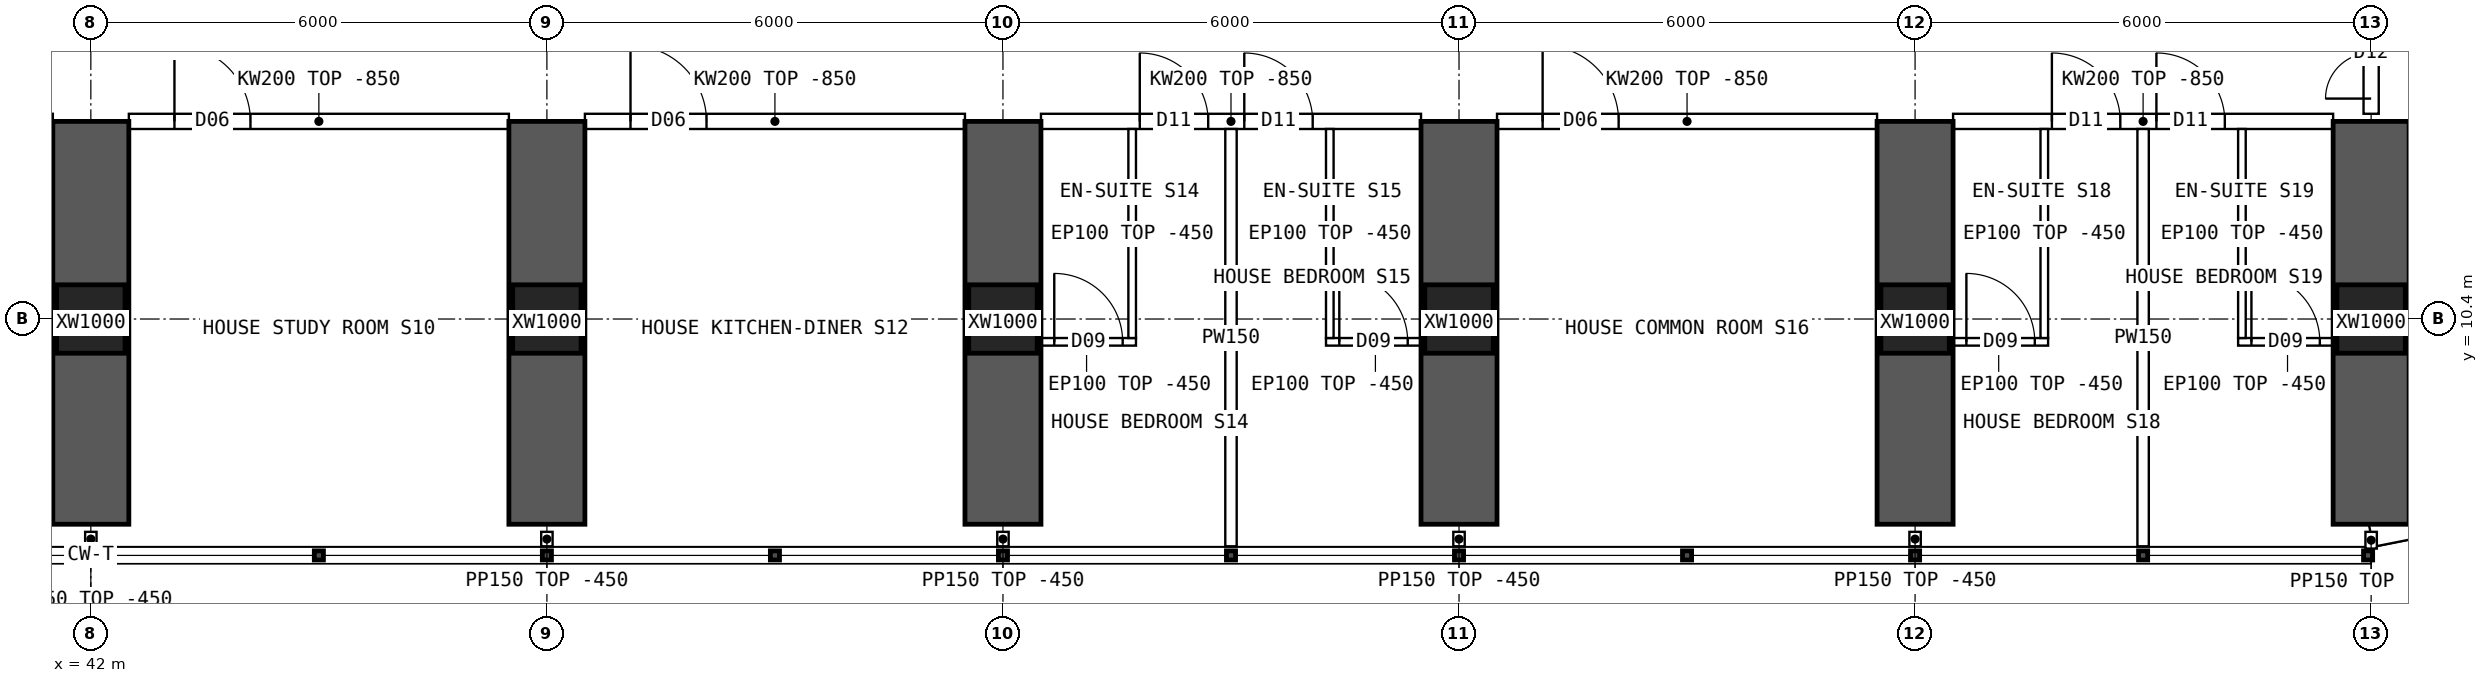
"""IFC4 building model, lengths in metres.
Left out: names, types, materials, properties, quantities, classifications, styles, units other than length and angle.
Written with IfcOpenShell. Run it as: python <this file> out.ifc"""

import sys

from ifc_helpers import new_model, si_unit, direction, frame, frame_2d, origin, origin_2d, place, context, subcontext, project, spatial, polyline, rectangle, hollow_rectangle, outline, extrude, element, fill, save


model = new_model("IFC4")
c1 = context("Model", 3, precision=1e-05, world=origin(), true_north=direction((0.0, 1.0)))
c2 = subcontext(c1, "Body", "Model", "MODEL_VIEW")
j1 = project(units=[si_unit("LENGTHUNIT", "METRE"), si_unit("PLANEANGLEUNIT", "RADIAN")], contexts=[c1])
p1 = place(None, origin())
s1 = spatial("IfcSite", under=j1, at=p1, CompositionType="ELEMENT")
p2 = place(p1, origin())
s2 = spatial("IfcBuilding", under=s1, at=p2, CompositionType="ELEMENT")
p3 = place(p2, frame((0.0, 0.0, 50.2)))
s3 = spatial("IfcBuildingStorey", under=s2, at=p3, CompositionType="ELEMENT", Elevation=50.2)
for number, where, z_axis, x_axis in (
    (1, (42.0, 10.4, 0.0), (0.0, 0.0, 1.0), (1.0, 0.0, 0.0)),
    (2, (48.0, 10.4, 0.0), (0.0, 0.0, 1.0), (1.0, 0.0, 0.0)),
    (3, (54.0, 10.4, 0.0), (0.0, 0.0, 1.0), (1.0, 0.0, 0.0)),
    (4, (60.0, 10.4, 0.0), (0.0, 0.0, 1.0), (1.0, 0.0, 0.0)),
    (5, (66.0, 10.4, 0.0), (0.0, 0.0, 1.0), (1.0, 0.0, 0.0)),
    (6, (72.0, 10.4, 0.0), (0.0, 0.0, 1.0), (1.0, 0.0, 0.0)),
):
    element("IfcColumn", number, at=place(p3, frame(where, z_axis=z_axis, x_axis=x_axis)), inside=s3, PredefinedType="COLUMN", context=c2, shape_type="SweptSolid", body=[
        extrude(hollow_rectangle(XDim=0.9, YDim=0.9, WallThickness=0.09, at=origin_2d()), origin(), (0.0, 0.0, 1.0), 3.75),
    ])
for number, where, z_axis, x_axis in (
    (7, (42.0, 7.7, 0.0), (0.0, 0.0, 1.0), (0.0, 1.0, 0.0)),
    (8, (48.0, 7.7, 0.0), (0.0, 0.0, 1.0), (0.0, 1.0, 0.0)),
    (9, (54.0, 7.7, 0.0), (0.0, 0.0, 1.0), (0.0, 1.0, 0.0)),
    (10, (60.0, 7.7, 0.0), (0.0, 0.0, 1.0), (0.0, 1.0, 0.0)),
    (11, (66.0, 7.7, 0.0), (0.0, 0.0, 1.0), (0.0, 1.0, 0.0)),
    (12, (72.0, 7.7, 0.0), (0.0, 0.0, 1.0), (0.0, 1.0, 0.0)),
):
    element("IfcWall", number, at=place(p3, frame(where, z_axis=z_axis, x_axis=x_axis)), inside=s3, PredefinedType="SHEAR", context=c2, shape_type="SweptSolid", body=[
        extrude(rectangle(XDim=5.3, YDim=1.0, at=frame_2d((2.65, 0.0))), origin(), (0.0, 0.0, 1.0), 3.75),
    ])
p4 = place(p3, frame((72.0, 7.55, 0.0), z_axis=(0.0, 0.0, 1.0), x_axis=(0.980787251524, 0.195080412259, 0.0)))
e13 = element("IfcWall", 13, at=p4, inside=s3, PredefinedType="SOLIDWALL", context=c2, shape_type="SweptSolid", body=[
    extrude(outline(polyline([(-0.03, -0.15), (3.249, -0.15), (3.189, 0.15), (0.03, 0.15), (-0.03, -0.15)])), origin(), (0.0, 0.0, 1.0), 3.3),
])
p5 = place(p4, frame((0.909, 0.0, 0.9)))
e14 = element("IfcOpeningElement", 14, at=p5, cuts=e13, PredefinedType="OPENING", context=c2, shape_type="SweptSolid", body=[
    extrude(rectangle(XDim=1.4, YDim=1.8, at=frame_2d((0.7, 0.9))), frame((0.0, 0.16, 0.0), z_axis=(0.0, -1.0, 0.0), x_axis=(1.0, 0.0, 0.0)), (0.0, 0.0, 1.0), 0.32),
])
p6 = place(p3, frame((42.5, 13.0, 0.0), z_axis=(0.0, 0.0, 1.0), x_axis=(1.0, 0.0, 0.0)))
e15 = element("IfcWall", 15, at=p6, inside=s3, PredefinedType="SOLIDWALL", context=c2, shape_type="SweptSolid", body=[
    extrude(outline(polyline([(0.0, 0.0), (5.0, 0.0), (5.0, 2.9), (0.0, 2.9), (0.0, 0.0)])), frame((0.0, 0.1, 0.0), z_axis=(0.0, -1.0, 0.0), x_axis=(1.0, 0.0, 0.0)), (0.0, 0.0, 1.0), 0.2),
])
p7 = place(p6, frame((0.6, 0.0, 0.0)))
e16 = element("IfcOpeningElement", 16, at=p7, cuts=e15, PredefinedType="OPENING", context=c2, shape_type="SweptSolid", body=[
    extrude(rectangle(XDim=1.0, YDim=2.1, at=frame_2d((0.5, 1.05))), frame((0.0, 0.11, 0.0), z_axis=(0.0, -1.0, 0.0), x_axis=(1.0, 0.0, 0.0)), (0.0, 0.0, 1.0), 0.22),
])
p8 = place(p3, frame((48.5, 13.0, 0.0), z_axis=(0.0, 0.0, 1.0), x_axis=(1.0, 0.0, 0.0)))
e17 = element("IfcWall", 17, at=p8, inside=s3, PredefinedType="SOLIDWALL", context=c2, shape_type="SweptSolid", body=[
    extrude(outline(polyline([(0.0, 0.0), (5.0, 0.0), (5.0, 2.9), (0.0, 2.9), (0.0, 0.0)])), frame((0.0, 0.1, 0.0), z_axis=(0.0, -1.0, 0.0), x_axis=(1.0, 0.0, 0.0)), (0.0, 0.0, 1.0), 0.2),
])
p9 = place(p8, frame((0.6, 0.0, 0.0)))
e18 = element("IfcOpeningElement", 18, at=p9, cuts=e17, PredefinedType="OPENING", context=c2, shape_type="SweptSolid", body=[
    extrude(rectangle(XDim=1.0, YDim=2.1, at=frame_2d((0.5, 1.05))), frame((0.0, 0.11, 0.0), z_axis=(0.0, -1.0, 0.0), x_axis=(1.0, 0.0, 0.0)), (0.0, 0.0, 1.0), 0.22),
])
p10 = place(p3, frame((54.5, 13.0, 0.0), z_axis=(0.0, 0.0, 1.0), x_axis=(1.0, 0.0, 0.0)))
e19 = element("IfcWall", 19, at=p10, inside=s3, PredefinedType="SOLIDWALL", context=c2, shape_type="SweptSolid", body=[
    extrude(outline(polyline([(0.0, 0.0), (5.0, 0.0), (5.0, 2.9), (0.0, 2.9), (0.0, 0.0)])), frame((0.0, 0.1, 0.0), z_axis=(0.0, -1.0, 0.0), x_axis=(1.0, 0.0, 0.0)), (0.0, 0.0, 1.0), 0.2),
])
p11 = place(p10, frame((1.3, 0.0, 0.0)))
e20 = element("IfcOpeningElement", 20, at=p11, cuts=e19, PredefinedType="OPENING", context=c2, shape_type="SweptSolid", body=[
    extrude(rectangle(XDim=0.9, YDim=2.1, at=frame_2d((0.45, 1.05))), frame((0.0, 0.11, 0.0), z_axis=(0.0, -1.0, 0.0), x_axis=(1.0, 0.0, 0.0)), (0.0, 0.0, 1.0), 0.22),
])
p12 = place(p10, frame((2.675, 0.0, 0.0)))
e21 = element("IfcOpeningElement", 21, at=p12, cuts=e19, PredefinedType="OPENING", context=c2, shape_type="SweptSolid", body=[
    extrude(rectangle(XDim=0.9, YDim=2.1, at=frame_2d((0.45, 1.05))), frame((0.0, 0.11, 0.0), z_axis=(0.0, -1.0, 0.0), x_axis=(1.0, 0.0, 0.0)), (0.0, 0.0, 1.0), 0.22),
])
p13 = place(p3, frame((60.5, 13.0, 0.0), z_axis=(0.0, 0.0, 1.0), x_axis=(1.0, 0.0, 0.0)))
e22 = element("IfcWall", 22, at=p13, inside=s3, PredefinedType="SOLIDWALL", context=c2, shape_type="SweptSolid", body=[
    extrude(outline(polyline([(0.0, 0.0), (5.0, 0.0), (5.0, 2.9), (0.0, 2.9), (0.0, 0.0)])), frame((0.0, 0.1, 0.0), z_axis=(0.0, -1.0, 0.0), x_axis=(1.0, 0.0, 0.0)), (0.0, 0.0, 1.0), 0.2),
])
p14 = place(p13, frame((0.6, 0.0, 0.0)))
e23 = element("IfcOpeningElement", 23, at=p14, cuts=e22, PredefinedType="OPENING", context=c2, shape_type="SweptSolid", body=[
    extrude(rectangle(XDim=1.0, YDim=2.1, at=frame_2d((0.5, 1.05))), frame((0.0, 0.11, 0.0), z_axis=(0.0, -1.0, 0.0), x_axis=(1.0, 0.0, 0.0)), (0.0, 0.0, 1.0), 0.22),
])
p15 = place(p3, frame((66.5, 13.0, 0.0), z_axis=(0.0, 0.0, 1.0), x_axis=(1.0, 0.0, 0.0)))
e24 = element("IfcWall", 24, at=p15, inside=s3, PredefinedType="SOLIDWALL", context=c2, shape_type="SweptSolid", body=[
    extrude(outline(polyline([(0.0, 0.0), (5.0, 0.0), (5.0, 2.9), (0.0, 2.9), (0.0, 0.0)])), frame((0.0, 0.1, 0.0), z_axis=(0.0, -1.0, 0.0), x_axis=(1.0, 0.0, 0.0)), (0.0, 0.0, 1.0), 0.2),
])
p16 = place(p15, frame((1.3, 0.0, 0.0)))
e25 = element("IfcOpeningElement", 25, at=p16, cuts=e24, PredefinedType="OPENING", context=c2, shape_type="SweptSolid", body=[
    extrude(rectangle(XDim=0.9, YDim=2.1, at=frame_2d((0.45, 1.05))), frame((0.0, 0.11, 0.0), z_axis=(0.0, -1.0, 0.0), x_axis=(1.0, 0.0, 0.0)), (0.0, 0.0, 1.0), 0.22),
])
p17 = place(p15, frame((2.675, 0.0, 0.0)))
e26 = element("IfcOpeningElement", 26, at=p17, cuts=e24, PredefinedType="OPENING", context=c2, shape_type="SweptSolid", body=[
    extrude(rectangle(XDim=0.9, YDim=2.1, at=frame_2d((0.45, 1.05))), frame((0.0, 0.11, 0.0), z_axis=(0.0, -1.0, 0.0), x_axis=(1.0, 0.0, 0.0)), (0.0, 0.0, 1.0), 0.22),
])
p18 = place(p3, frame((38.85, 10.3, 0.0), z_axis=(0.0, 0.0, 1.0), x_axis=(1.0, 0.0, 0.0)))
e27 = element("IfcWall", 27, at=p18, inside=s3, PredefinedType="PARTITIONING", context=c2, shape_type="SweptSolid", body=[
    extrude(outline(polyline([(0.0, 0.0), (2.7, 0.0), (2.7, 2.9), (0.0, 2.9), (0.0, 0.0)])), frame((0.0, 0.05, 0.0), z_axis=(0.0, -1.0, 0.0), x_axis=(1.0, 0.0, 0.0)), (0.0, 0.0, 1.0), 0.1),
])
p19 = place(p3, frame((57.0, 7.41, 0.0), z_axis=(0.0, 0.0, 1.0), x_axis=(0.0, 1.0, 0.0)))
e28 = element("IfcWall", 28, at=p19, inside=s3, PredefinedType="PARTITIONING", context=c2, shape_type="SweptSolid", body=[
    extrude(outline(polyline([(0.0, 0.0), (5.49, 0.0), (5.49, 2.9), (5.442, 2.9), (5.44, 3.3), (3.192, 3.3), (3.19, 2.9), (2.792, 2.9), (2.79, 3.3), (0.0, 3.3), (0.0, 0.0)])), frame((0.0, 0.075, 0.0), z_axis=(0.0, -1.0, 0.0), x_axis=(1.0, 0.0, 0.0)), (0.0, 0.0, 1.0), 0.15),
])
p20 = place(p3, frame((55.75, 10.1, 0.0), z_axis=(0.0, 0.0, 1.0), x_axis=(-1.0, 0.0, 0.0)))
e29 = element("IfcWall", 29, at=p20, inside=s3, PredefinedType="PARTITIONING", context=c2, shape_type="SweptSolid", body=[
    extrude(rectangle(XDim=1.3, YDim=0.1, at=frame_2d((0.65, 0.0))), origin(), (0.0, 0.0, 1.0), 3.3),
])
p21 = place(p20, frame((0.175, 0.0, 0.0)))
e30 = element("IfcOpeningElement", 30, at=p21, cuts=e29, PredefinedType="OPENING", context=c2, shape_type="SweptSolid", body=[
    extrude(rectangle(XDim=0.9, YDim=2.1, at=frame_2d((0.45, 1.05))), frame((0.0, 0.06, 0.0), z_axis=(0.0, -1.0, 0.0), x_axis=(1.0, 0.0, 0.0)), (0.0, 0.0, 1.0), 0.12),
])
p22 = place(p3, frame((55.7, 10.15, 0.0), z_axis=(0.0, 0.0, 1.0), x_axis=(0.0, 1.0, 0.0)))
e31 = element("IfcWall", 31, at=p22, inside=s3, PredefinedType="PARTITIONING", context=c2, shape_type="SweptSolid", body=[
    extrude(outline(polyline([(0.0, 0.0), (2.75, 0.0), (2.75, 2.9), (2.702, 2.9), (2.7, 3.3), (0.452, 3.3), (0.45, 2.9), (0.052, 2.9), (0.05, 3.3), (0.0, 3.3), (0.0, 0.0)])), frame((0.0, 0.05, 0.0), z_axis=(0.0, -1.0, 0.0), x_axis=(1.0, 0.0, 0.0)), (0.0, 0.0, 1.0), 0.1),
])
p23 = place(p3, frame((59.55, 10.1, 0.0), z_axis=(0.0, 0.0, 1.0), x_axis=(-1.0, 0.0, 0.0)))
e32 = element("IfcWall", 32, at=p23, inside=s3, PredefinedType="PARTITIONING", context=c2, shape_type="SweptSolid", body=[
    extrude(rectangle(XDim=1.3, YDim=0.1, at=frame_2d((0.65, 0.0))), origin(), (0.0, 0.0, 1.0), 3.3),
])
p24 = place(p23, frame((0.225, 0.0, 0.0)))
e33 = element("IfcOpeningElement", 33, at=p24, cuts=e32, PredefinedType="OPENING", context=c2, shape_type="SweptSolid", body=[
    extrude(rectangle(XDim=0.9, YDim=2.1, at=frame_2d((0.45, 1.05))), frame((0.0, 0.06, 0.0), z_axis=(0.0, -1.0, 0.0), x_axis=(1.0, 0.0, 0.0)), (0.0, 0.0, 1.0), 0.12),
])
p25 = place(p3, frame((58.3, 10.15, 0.0), z_axis=(0.0, 0.0, 1.0), x_axis=(0.0, 1.0, 0.0)))
e34 = element("IfcWall", 34, at=p25, inside=s3, PredefinedType="PARTITIONING", context=c2, shape_type="SweptSolid", body=[
    extrude(outline(polyline([(0.0, 0.0), (2.75, 0.0), (2.75, 2.9), (2.702, 2.9), (2.7, 3.3), (0.452, 3.3), (0.45, 2.9), (0.052, 2.9), (0.05, 3.3), (0.0, 3.3), (0.0, 0.0)])), frame((0.0, 0.05, 0.0), z_axis=(0.0, -1.0, 0.0), x_axis=(1.0, 0.0, 0.0)), (0.0, 0.0, 1.0), 0.1),
])
p26 = place(p3, frame((69.0, 7.41, 0.0), z_axis=(0.0, 0.0, 1.0), x_axis=(0.0, 1.0, 0.0)))
e35 = element("IfcWall", 35, at=p26, inside=s3, PredefinedType="PARTITIONING", context=c2, shape_type="SweptSolid", body=[
    extrude(outline(polyline([(0.0, 0.0), (5.49, 0.0), (5.49, 2.9), (5.442, 2.9), (5.44, 3.3), (3.192, 3.3), (3.19, 2.9), (2.792, 2.9), (2.79, 3.3), (0.0, 3.3), (0.0, 0.0)])), frame((0.0, 0.075, 0.0), z_axis=(0.0, -1.0, 0.0), x_axis=(1.0, 0.0, 0.0)), (0.0, 0.0, 1.0), 0.15),
])
p27 = place(p3, frame((67.75, 10.1, 0.0), z_axis=(0.0, 0.0, 1.0), x_axis=(-1.0, 0.0, 0.0)))
e36 = element("IfcWall", 36, at=p27, inside=s3, PredefinedType="PARTITIONING", context=c2, shape_type="SweptSolid", body=[
    extrude(rectangle(XDim=1.3, YDim=0.1, at=frame_2d((0.65, 0.0))), origin(), (0.0, 0.0, 1.0), 3.3),
])
p28 = place(p27, frame((0.175, 0.0, 0.0)))
e37 = element("IfcOpeningElement", 37, at=p28, cuts=e36, PredefinedType="OPENING", context=c2, shape_type="SweptSolid", body=[
    extrude(rectangle(XDim=0.9, YDim=2.1, at=frame_2d((0.45, 1.05))), frame((0.0, 0.06, 0.0), z_axis=(0.0, -1.0, 0.0), x_axis=(1.0, 0.0, 0.0)), (0.0, 0.0, 1.0), 0.12),
])
p29 = place(p3, frame((67.7, 10.15, 0.0), z_axis=(0.0, 0.0, 1.0), x_axis=(0.0, 1.0, 0.0)))
e38 = element("IfcWall", 38, at=p29, inside=s3, PredefinedType="PARTITIONING", context=c2, shape_type="SweptSolid", body=[
    extrude(outline(polyline([(0.0, 0.0), (2.75, 0.0), (2.75, 2.9), (2.702, 2.9), (2.7, 3.3), (0.452, 3.3), (0.45, 2.9), (0.052, 2.9), (0.05, 3.3), (0.0, 3.3), (0.0, 0.0)])), frame((0.0, 0.05, 0.0), z_axis=(0.0, -1.0, 0.0), x_axis=(1.0, 0.0, 0.0)), (0.0, 0.0, 1.0), 0.1),
])
p30 = place(p3, frame((71.55, 10.1, 0.0), z_axis=(0.0, 0.0, 1.0), x_axis=(-1.0, 0.0, 0.0)))
e39 = element("IfcWall", 39, at=p30, inside=s3, PredefinedType="PARTITIONING", context=c2, shape_type="SweptSolid", body=[
    extrude(rectangle(XDim=1.3, YDim=0.1, at=frame_2d((0.65, 0.0))), origin(), (0.0, 0.0, 1.0), 3.3),
])
p31 = place(p30, frame((0.225, 0.0, 0.0)))
e40 = element("IfcOpeningElement", 40, at=p31, cuts=e39, PredefinedType="OPENING", context=c2, shape_type="SweptSolid", body=[
    extrude(rectangle(XDim=0.9, YDim=2.1, at=frame_2d((0.45, 1.05))), frame((0.0, 0.06, 0.0), z_axis=(0.0, -1.0, 0.0), x_axis=(1.0, 0.0, 0.0)), (0.0, 0.0, 1.0), 0.12),
])
p32 = place(p3, frame((70.3, 10.15, 0.0), z_axis=(0.0, 0.0, 1.0), x_axis=(0.0, 1.0, 0.0)))
e41 = element("IfcWall", 41, at=p32, inside=s3, PredefinedType="PARTITIONING", context=c2, shape_type="SweptSolid", body=[
    extrude(outline(polyline([(0.0, 0.0), (2.75, 0.0), (2.75, 2.9), (2.702, 2.9), (2.7, 3.3), (0.452, 3.3), (0.45, 2.9), (0.052, 2.9), (0.05, 3.3), (0.0, 3.3), (0.0, 0.0)])), frame((0.0, 0.05, 0.0), z_axis=(0.0, -1.0, 0.0), x_axis=(1.0, 0.0, 0.0)), (0.0, 0.0, 1.0), 0.1),
])
p33 = place(p3, frame((72.0, 13.1, 0.0), z_axis=(0.0, 0.0, 1.0), x_axis=(0.0, 1.0, 0.0)))
e42 = element("IfcWall", 42, at=p33, inside=s3, PredefinedType="SOLIDWALL", context=c2, shape_type="SweptSolid", body=[
    extrude(outline(polyline([(0.0, 0.0), (1.6, 0.0), (1.6, 2.85), (0.0, 2.85), (0.0, 0.0)])), frame((0.0, 0.1, 0.0), z_axis=(0.0, -1.0, 0.0), x_axis=(1.0, 0.0, 0.0)), (0.0, 0.0, 1.0), 0.2),
])
p34 = place(p33, frame((0.2, 0.0, 0.0)))
e43 = element("IfcOpeningElement", 43, at=p34, cuts=e42, PredefinedType="OPENING", context=c2, shape_type="SweptSolid", body=[
    extrude(rectangle(XDim=1.2, YDim=2.1, at=frame_2d((0.6, 1.05))), frame((0.0, 0.11, 0.0), z_axis=(0.0, -1.0, 0.0), x_axis=(1.0, 0.0, 0.0)), (0.0, 0.0, 1.0), 0.22),
])
for number, where, z_axis, x_axis in (
    (44, (42.0, 7.6, 0.0), (0.0, 0.0, 1.0), (0.0, -1.0, 0.0)),
    (45, (48.0, 7.6, 0.0), (0.0, 0.0, 1.0), (0.0, -1.0, 0.0)),
    (46, (54.0, 7.6, 0.0), (0.0, 0.0, 1.0), (0.0, -1.0, 0.0)),
    (47, (60.0, 7.6, 0.0), (0.0, 0.0, 1.0), (0.0, -1.0, 0.0)),
    (48, (66.0, 7.6, 0.0), (0.0, 0.0, 1.0), (0.0, -1.0, 0.0)),
):
    element("IfcWall", number, at=place(p3, frame(where, z_axis=z_axis, x_axis=x_axis)), inside=s3, PredefinedType="PARTITIONING", context=c2, shape_type="SweptSolid", body=[
        extrude(rectangle(XDim=0.19, YDim=0.15, at=frame_2d((0.095, 0.0))), origin(), (0.0, 0.0, 1.0), 3.3),
    ])
p35 = place(p3, frame((72.0, 7.6, 0.0), z_axis=(0.0, 0.0, 1.0), x_axis=(0.0, -1.0, 0.0)))
e49 = element("IfcWall", 49, at=p35, inside=s3, PredefinedType="PARTITIONING", context=c2, shape_type="SweptSolid", body=[
    extrude(rectangle(XDim=0.22, YDim=0.15, at=frame_2d((0.11, 0.0))), origin(), (0.0, 0.0, 1.0), 3.3),
])
p36 = place(p7, origin())
e50 = element("IfcDoor", 50, at=p36, inside=s3, OperationType="SINGLE_SWING_LEFT", PredefinedType="DOOR", context=c2, shape_type="SweptSolid", body=[
    extrude(rectangle(XDim=1.0, YDim=2.1, at=frame_2d((0.5, 1.05))), frame((0.0, 0.025, 0.0), z_axis=(0.0, -1.0, 0.0), x_axis=(1.0, 0.0, 0.0)), (0.0, 0.0, 1.0), 0.05),
])
fill(e16, e50)
p37 = place(p9, origin())
e51 = element("IfcDoor", 51, at=p37, inside=s3, OperationType="SINGLE_SWING_LEFT", PredefinedType="DOOR", context=c2, shape_type="SweptSolid", body=[
    extrude(rectangle(XDim=1.0, YDim=2.1, at=frame_2d((0.5, 1.05))), frame((0.0, 0.025, 0.0), z_axis=(0.0, -1.0, 0.0), x_axis=(1.0, 0.0, 0.0)), (0.0, 0.0, 1.0), 0.05),
])
fill(e18, e51)
p38 = place(p21, origin())
e52 = element("IfcDoor", 52, at=p38, inside=s3, OperationType="SINGLE_SWING_RIGHT", PredefinedType="DOOR", context=c2, shape_type="SweptSolid", body=[
    extrude(rectangle(XDim=0.9, YDim=2.1, at=frame_2d((0.45, 1.05))), frame((0.0, 0.025, 0.0), z_axis=(0.0, -1.0, 0.0), x_axis=(1.0, 0.0, 0.0)), (0.0, 0.0, 1.0), 0.05),
])
fill(e30, e52)
p39 = place(p11, origin())
e53 = element("IfcDoor", 53, at=p39, inside=s3, OperationType="SINGLE_SWING_LEFT", PredefinedType="DOOR", context=c2, shape_type="SweptSolid", body=[
    extrude(rectangle(XDim=0.9, YDim=2.1, at=frame_2d((0.45, 1.05))), frame((0.0, 0.025, 0.0), z_axis=(0.0, -1.0, 0.0), x_axis=(1.0, 0.0, 0.0)), (0.0, 0.0, 1.0), 0.05),
])
fill(e20, e53)
p40 = place(p24, origin())
e54 = element("IfcDoor", 54, at=p40, inside=s3, OperationType="SINGLE_SWING_RIGHT", PredefinedType="DOOR", context=c2, shape_type="SweptSolid", body=[
    extrude(rectangle(XDim=0.9, YDim=2.1, at=frame_2d((0.45, 1.05))), frame((0.0, 0.025, 0.0), z_axis=(0.0, -1.0, 0.0), x_axis=(1.0, 0.0, 0.0)), (0.0, 0.0, 1.0), 0.05),
])
fill(e33, e54)
p41 = place(p12, origin())
e55 = element("IfcDoor", 55, at=p41, inside=s3, OperationType="SINGLE_SWING_LEFT", PredefinedType="DOOR", context=c2, shape_type="SweptSolid", body=[
    extrude(rectangle(XDim=0.9, YDim=2.1, at=frame_2d((0.45, 1.05))), frame((0.0, 0.025, 0.0), z_axis=(0.0, -1.0, 0.0), x_axis=(1.0, 0.0, 0.0)), (0.0, 0.0, 1.0), 0.05),
])
fill(e21, e55)
p42 = place(p14, origin())
e56 = element("IfcDoor", 56, at=p42, inside=s3, OperationType="SINGLE_SWING_LEFT", PredefinedType="DOOR", context=c2, shape_type="SweptSolid", body=[
    extrude(rectangle(XDim=1.0, YDim=2.1, at=frame_2d((0.5, 1.05))), frame((0.0, 0.025, 0.0), z_axis=(0.0, -1.0, 0.0), x_axis=(1.0, 0.0, 0.0)), (0.0, 0.0, 1.0), 0.05),
])
fill(e23, e56)
p43 = place(p28, origin())
e57 = element("IfcDoor", 57, at=p43, inside=s3, OperationType="SINGLE_SWING_RIGHT", PredefinedType="DOOR", context=c2, shape_type="SweptSolid", body=[
    extrude(rectangle(XDim=0.9, YDim=2.1, at=frame_2d((0.45, 1.05))), frame((0.0, 0.025, 0.0), z_axis=(0.0, -1.0, 0.0), x_axis=(1.0, 0.0, 0.0)), (0.0, 0.0, 1.0), 0.05),
])
fill(e37, e57)
p44 = place(p16, origin())
e58 = element("IfcDoor", 58, at=p44, inside=s3, OperationType="SINGLE_SWING_LEFT", PredefinedType="DOOR", context=c2, shape_type="SweptSolid", body=[
    extrude(rectangle(XDim=0.9, YDim=2.1, at=frame_2d((0.45, 1.05))), frame((0.0, 0.025, 0.0), z_axis=(0.0, -1.0, 0.0), x_axis=(1.0, 0.0, 0.0)), (0.0, 0.0, 1.0), 0.05),
])
fill(e25, e58)
p45 = place(p31, origin())
e59 = element("IfcDoor", 59, at=p45, inside=s3, OperationType="SINGLE_SWING_RIGHT", PredefinedType="DOOR", context=c2, shape_type="SweptSolid", body=[
    extrude(rectangle(XDim=0.9, YDim=2.1, at=frame_2d((0.45, 1.05))), frame((0.0, 0.025, 0.0), z_axis=(0.0, -1.0, 0.0), x_axis=(1.0, 0.0, 0.0)), (0.0, 0.0, 1.0), 0.05),
])
fill(e40, e59)
p46 = place(p17, origin())
e60 = element("IfcDoor", 60, at=p46, inside=s3, OperationType="SINGLE_SWING_LEFT", PredefinedType="DOOR", context=c2, shape_type="SweptSolid", body=[
    extrude(rectangle(XDim=0.9, YDim=2.1, at=frame_2d((0.45, 1.05))), frame((0.0, 0.025, 0.0), z_axis=(0.0, -1.0, 0.0), x_axis=(1.0, 0.0, 0.0)), (0.0, 0.0, 1.0), 0.05),
])
fill(e26, e60)
p47 = place(p34, origin())
e61 = element("IfcDoor", 61, at=p47, inside=s3, OperationType="DOUBLE_DOOR_SINGLE_SWING", PredefinedType="DOOR", context=c2, shape_type="SweptSolid", body=[
    extrude(rectangle(XDim=1.2, YDim=2.1, at=frame_2d((0.6, 1.05))), frame((0.0, 0.025, 0.0), z_axis=(0.0, -1.0, 0.0), x_axis=(1.0, 0.0, 0.0)), (0.0, 0.0, 1.0), 0.05),
])
fill(e43, e61)
save(model, sys.argv[1])
